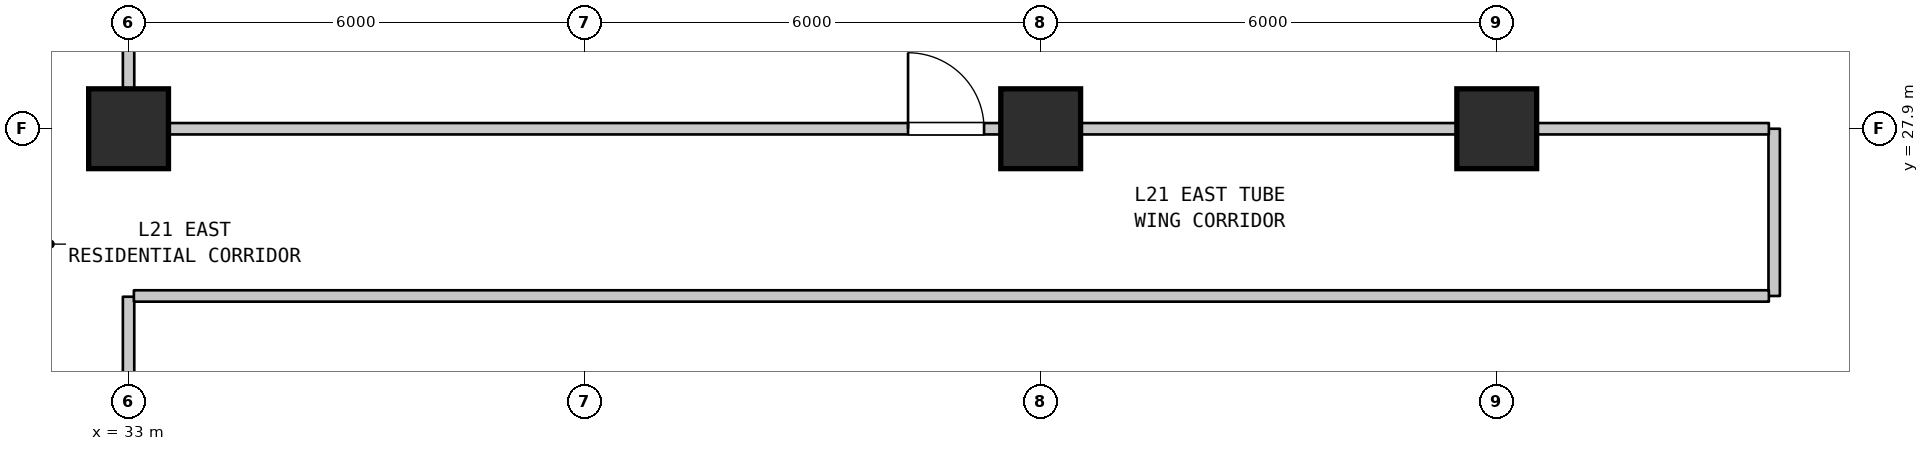
"""IFC4 building model, lengths in metres.
Left out: names, types, materials, properties, quantities, classifications, styles, units other than length and angle.
Written with IfcOpenShell. Run it as: python <this file> out.ifc"""

import sys

from ifc_helpers import new_model, si_unit, direction, frame, frame_2d, origin, origin_2d, place, context, subcontext, project, spatial, rectangle, extrude, element, fill, save


model = new_model("IFC4")
c1 = context("Model", 3, precision=1e-05, world=origin(), true_north=direction((0.0, 1.0)))
c2 = subcontext(c1, "Body", "Model", "MODEL_VIEW")
j1 = project(units=[si_unit("LENGTHUNIT", "METRE"), si_unit("PLANEANGLEUNIT", "RADIAN")], contexts=[c1])
p1 = place(None, origin())
s1 = spatial("IfcSite", under=j1, at=p1, CompositionType="ELEMENT")
p2 = place(p1, origin())
s2 = spatial("IfcBuilding", under=s1, at=p2, CompositionType="ELEMENT")
p3 = place(p2, frame((0.0, 0.0, 90.9)))
s3 = spatial("IfcBuildingStorey", under=s2, at=p3, CompositionType="ELEMENT", Elevation=90.9)
for number, where, z_axis, x_axis in (
    (1, (33.0, 27.9, 0.0), (0.0, 0.0, 1.0), (1.0, 0.0, 0.0)),
    (2, (45.0, 27.9, 0.0), (0.0, 0.0, 1.0), (1.0, 0.0, 0.0)),
    (3, (51.0, 27.9, 0.0), (0.0, 0.0, 1.0), (1.0, 0.0, 0.0)),
):
    element("IfcColumn", number, at=place(p3, frame(where, z_axis=z_axis, x_axis=x_axis)), inside=s3, PredefinedType="COLUMN", context=c2, shape_type="SweptSolid", body=[
        extrude(rectangle(XDim=1.05, YDim=1.05, at=origin_2d()), origin(), (0.0, 0.0, 1.0), 3.7),
    ])
p4 = place(p3, frame((33.0, 19.51, 0.0), z_axis=(0.0, 0.0, 1.0), x_axis=(0.0, 1.0, 0.0)))
e4 = element("IfcWall", 4, at=p4, inside=s3, PredefinedType="STANDARD", context=c2, shape_type="SweptSolid", body=[
    extrude(rectangle(XDim=6.18, YDim=0.15, at=frame_2d((3.09, 0.0))), origin(), (0.0, 0.0, 1.0), 2.935),
])
p5 = place(p3, frame((33.0, 27.91, 0.0), z_axis=(0.0, 0.0, 1.0), x_axis=(0.0, 1.0, 0.0)))
e5 = element("IfcWall", 5, at=p5, inside=s3, PredefinedType="STANDARD", context=c2, shape_type="SweptSolid", body=[
    extrude(rectangle(XDim=9.98, YDim=0.15, at=frame_2d((4.99, 0.0))), origin(), (0.0, 0.0, 1.0), 2.885),
])
p6 = place(p3, frame((54.65, 25.7, 0.0), z_axis=(0.0, 0.0, 1.0), x_axis=(0.0, 1.0, 0.0)))
e6 = element("IfcWall", 6, at=p6, inside=s3, PredefinedType="STANDARD", context=c2, shape_type="SweptSolid", body=[
    extrude(rectangle(XDim=2.2, YDim=0.15, at=frame_2d((1.1, 0.0))), origin(), (0.0, 0.0, 1.0), 3.385),
])
p7 = place(p3, frame((33.07, 25.7, 0.0), z_axis=(0.0, 0.0, 1.0), x_axis=(1.0, 0.0, 0.0)))
e7 = element("IfcWall", 7, at=p7, inside=s3, PredefinedType="STANDARD", context=c2, shape_type="SweptSolid", body=[
    extrude(rectangle(XDim=21.51, YDim=0.15, at=frame_2d((10.755, 0.0))), origin(), (0.0, 0.0, 1.0), 3.385),
])
p8 = place(p3, frame((33.07, 27.9, 0.0), z_axis=(0.0, 0.0, 1.0), x_axis=(1.0, 0.0, 0.0)))
e8 = element("IfcWall", 8, at=p8, inside=s3, PredefinedType="STANDARD", context=c2, shape_type="SweptSolid", body=[
    extrude(rectangle(XDim=11.93, YDim=0.15, at=frame_2d((5.965, 0.0))), origin(), (0.0, 0.0, 1.0), 2.885),
])
p9 = place(p8, frame((10.185, 0.0, 0.0)))
e9 = element("IfcOpeningElement", 9, at=p9, cuts=e8, PredefinedType="OPENING", context=c2, shape_type="SweptSolid", body=[
    extrude(rectangle(XDim=1.0, YDim=2.15, at=frame_2d((0.5, 1.075))), frame((0.0, 0.085, 0.0), z_axis=(0.0, -1.0, 0.0), x_axis=(1.0, 0.0, 0.0)), (0.0, 0.0, 1.0), 0.17),
])
p10 = place(p3, frame((45.0, 27.9, 0.0), z_axis=(0.0, 0.0, 1.0), x_axis=(1.0, 0.0, 0.0)))
e10 = element("IfcWall", 10, at=p10, inside=s3, PredefinedType="STANDARD", context=c2, shape_type="SweptSolid", body=[
    extrude(rectangle(XDim=9.58, YDim=0.15, at=frame_2d((4.79, 0.0))), origin(), (0.0, 0.0, 1.0), 2.935),
])
p11 = place(p9, origin())
e11 = element("IfcDoor", 11, at=p11, inside=s3, OperationType="SINGLE_SWING_LEFT", PredefinedType="DOOR", context=c2, shape_type="SweptSolid", body=[
    extrude(rectangle(XDim=1.0, YDim=2.15, at=frame_2d((0.5, 1.075))), frame((0.0, 0.025, 0.0), z_axis=(0.0, -1.0, 0.0), x_axis=(1.0, 0.0, 0.0)), (0.0, 0.0, 1.0), 0.05),
])
fill(e9, e11)
save(model, sys.argv[1])
